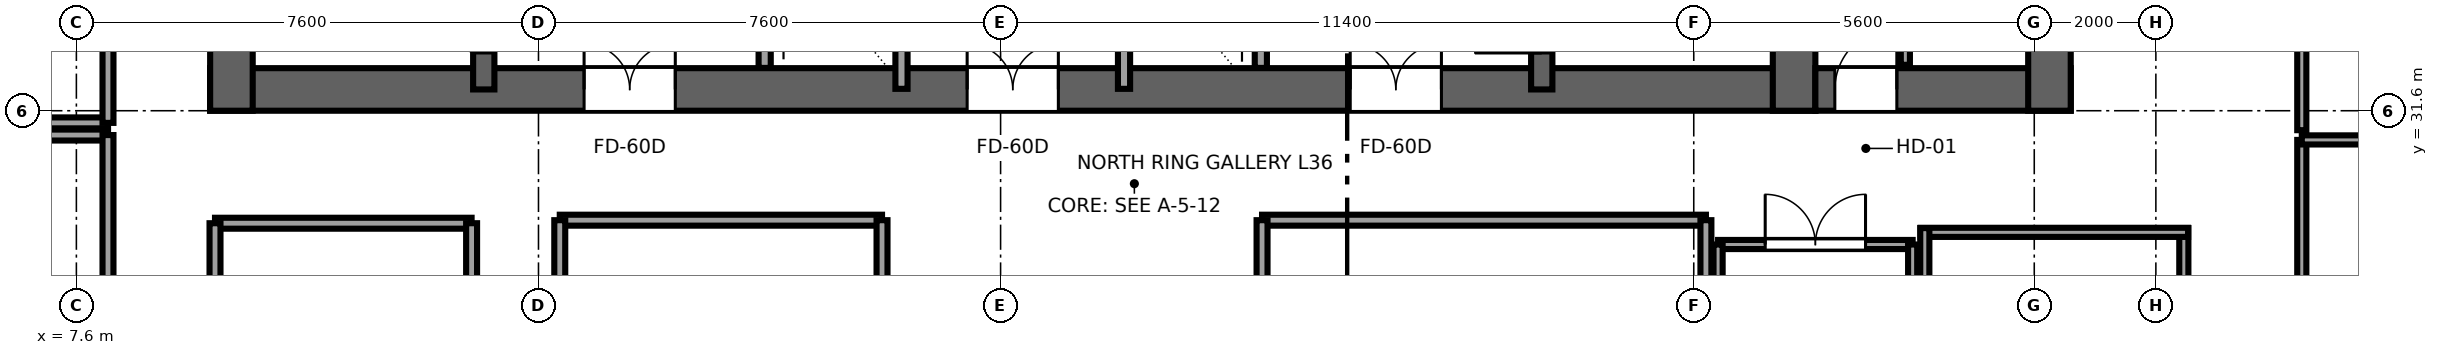
"""IFC4 building model, lengths in metres.
Left out: names, types, materials, properties, quantities, classifications, styles, units other than length and angle.
Written with IfcOpenShell. Run it as: python <this file> out.ifc"""

import sys

from ifc_helpers import new_model, si_unit, direction, frame, frame_2d, origin, place, context, subcontext, project, spatial, rectangle, extrude, source, transform, mapped, element, fill, save


model = new_model("IFC4")
c1 = context("Model", 3, precision=1e-05, world=origin(), true_north=direction((0.0, 1.0)))
c2 = subcontext(c1, "Body", "Model", "MODEL_VIEW")
j1 = project(units=[si_unit("LENGTHUNIT", "METRE"), si_unit("PLANEANGLEUNIT", "RADIAN")], contexts=[c1])
p1 = place(None, origin())
s1 = spatial("IfcSite", under=j1, at=p1, CompositionType="ELEMENT")
p2 = place(p1, origin())
s2 = spatial("IfcBuilding", under=s1, at=p2, CompositionType="ELEMENT")
p3 = place(p2, frame((0.0, 0.0, 139.95)))
s3 = spatial("IfcBuildingStorey", under=s2, at=p3, CompositionType="ELEMENT", Elevation=139.95)
p4 = place(p3, frame((9.8, 31.95, 0.0), z_axis=(0.0, 0.0, 1.0), x_axis=(1.0, 0.0, 0.0)))
e1 = element("IfcWall", 1, at=p4, inside=s3, PredefinedType="SHEAR", context=c2, shape_type="SweptSolid", body=[
    extrude(rectangle(XDim=26.4, YDim=0.7, at=frame_2d((13.2, 0.0))), origin(), (0.0, 0.0, 1.0), 3.55),
])
p5 = place(p4, frame((7.65, 0.0, 0.0), z_axis=(0.0, 0.0, 1.0), x_axis=(-1.0, 0.0, 0.0)))
e2 = element("IfcOpeningElement", 2, at=p5, cuts=e1, PredefinedType="OPENING", context=c2, shape_type="SweptSolid", body=[
    extrude(rectangle(XDim=1.5, YDim=2.04, at=frame_2d((0.75, 1.02))), frame((0.0, 0.36, 0.0), z_axis=(0.0, -1.0, 0.0), x_axis=(1.0, 0.0, 0.0)), (0.0, 0.0, 1.0), 0.72),
])
p6 = place(p4, frame((13.95, 0.0, 0.0), z_axis=(0.0, 0.0, 1.0), x_axis=(-1.0, 0.0, 0.0)))
e3 = element("IfcOpeningElement", 3, at=p6, cuts=e1, PredefinedType="OPENING", context=c2, shape_type="SweptSolid", body=[
    extrude(rectangle(XDim=1.5, YDim=2.04, at=frame_2d((0.75, 1.02))), frame((0.0, 0.36, 0.0), z_axis=(0.0, -1.0, 0.0), x_axis=(1.0, 0.0, 0.0)), (0.0, 0.0, 1.0), 0.72),
])
p7 = place(p4, frame((20.25, 0.0, 0.0), z_axis=(0.0, 0.0, 1.0), x_axis=(-1.0, 0.0, 0.0)))
e4 = element("IfcOpeningElement", 4, at=p7, cuts=e1, PredefinedType="OPENING", context=c2, shape_type="SweptSolid", body=[
    extrude(rectangle(XDim=1.5, YDim=2.04, at=frame_2d((0.75, 1.02))), frame((0.0, 0.36, 0.0), z_axis=(0.0, -1.0, 0.0), x_axis=(1.0, 0.0, 0.0)), (0.0, 0.0, 1.0), 0.72),
])
for number, where, z_axis, x_axis in (
    (5, (10.15, 31.6, 0.0), (0.0, 0.0, 1.0), (0.0, 1.0, 0.0)),
    (6, (35.85, 31.6, 0.0), (0.0, 0.0, 1.0), (0.0, 1.0, 0.0)),
):
    element("IfcWall", number, at=place(p3, frame(where, z_axis=z_axis, x_axis=x_axis)), inside=s3, PredefinedType="SHEAR", context=c2, shape_type="SweptSolid", body=[
        extrude(rectangle(XDim=13.6, YDim=0.7, at=frame_2d((6.8, 0.0))), origin(), (0.0, 0.0, 1.0), 3.55),
    ])
p8 = place(p3, frame((14.3, 31.95, 0.0), z_axis=(0.0, 0.0, 1.0), x_axis=(0.0, 1.0, 0.0)))
e7 = element("IfcWall", 7, at=p8, inside=s3, PredefinedType="SHEAR", context=c2, shape_type="SweptSolid", body=[
    extrude(rectangle(XDim=12.9, YDim=0.35, at=frame_2d((6.45, 0.0))), origin(), (0.0, 0.0, 1.0), 3.55),
])
p9 = place(p8, frame((0.6, 0.0, 0.0)))
e8 = element("IfcOpeningElement", 8, at=p9, cuts=e7, PredefinedType="OPENING", context=c2, shape_type="SweptSolid", body=[
    extrude(rectangle(XDim=1.1, YDim=2.12, at=frame_2d((0.55, 1.06))), frame((0.0, 0.185, 0.0), z_axis=(0.0, -1.0, 0.0), x_axis=(1.0, 0.0, 0.0)), (0.0, 0.0, 1.0), 0.37),
])
p10 = place(p3, frame((31.7, 31.95, 0.0), z_axis=(0.0, 0.0, 1.0), x_axis=(0.0, 1.0, 0.0)))
e9 = element("IfcWall", 9, at=p10, inside=s3, PredefinedType="SHEAR", context=c2, shape_type="SweptSolid", body=[
    extrude(rectangle(XDim=12.9, YDim=0.35, at=frame_2d((6.45, 0.0))), origin(), (0.0, 0.0, 1.0), 3.55),
])
p11 = place(p10, frame((1.7, 0.0, 0.0), z_axis=(0.0, 0.0, 1.0), x_axis=(-1.0, 0.0, 0.0)))
e10 = element("IfcOpeningElement", 10, at=p11, cuts=e9, PredefinedType="OPENING", context=c2, shape_type="SweptSolid", body=[
    extrude(rectangle(XDim=1.1, YDim=2.12, at=frame_2d((0.55, 1.06))), frame((0.0, 0.185, 0.0), z_axis=(0.0, -1.0, 0.0), x_axis=(1.0, 0.0, 0.0)), (0.0, 0.0, 1.0), 0.37),
])
p12 = place(p3, frame((36.2, 31.95, 0.0), z_axis=(0.0, 0.0, 1.0), x_axis=(1.0, 0.0, 0.0)))
e11 = element("IfcWall", 11, at=p12, inside=s3, PredefinedType="SHEAR", context=c2, shape_type="SweptSolid", body=[
    extrude(rectangle(XDim=4.2, YDim=0.7, at=frame_2d((2.1, 0.0))), origin(), (0.0, 0.0, 1.0), 3.55),
])
p13 = place(p12, frame((1.34, 0.0, 0.0), z_axis=(0.0, 0.0, 1.0), x_axis=(-1.0, 0.0, 0.0)))
e12 = element("IfcOpeningElement", 12, at=p13, cuts=e11, PredefinedType="OPENING", context=c2, shape_type="SweptSolid", body=[
    extrude(rectangle(XDim=1.02, YDim=2.03, at=frame_2d((0.51, 1.015))), frame((0.0, 0.36, 0.0), z_axis=(0.0, -1.0, 0.0), x_axis=(1.0, 0.0, 0.0)), (0.0, 0.0, 1.0), 0.72),
])
p14 = place(p3, frame((40.05, 31.6, 0.0), z_axis=(0.0, 0.0, 1.0), x_axis=(0.0, 1.0, 0.0)))
e13 = element("IfcWall", 13, at=p14, inside=s3, PredefinedType="SHEAR", context=c2, shape_type="SweptSolid", body=[
    extrude(rectangle(XDim=13.6, YDim=0.7, at=frame_2d((6.8, 0.0))), origin(), (0.0, 0.0, 1.0), 3.55),
])
for number, where, z_axis, x_axis in (
    (14, (18.92, 32.304, 0.0), (0.0, 0.0, 1.0), (0.0, 1.0, 0.0)),
    (15, (27.08, 32.304, 0.0), (0.0, 0.0, 1.0), (0.0, 1.0, 0.0)),
):
    element("IfcWall", number, at=place(p3, frame(where, z_axis=z_axis, x_axis=x_axis)), inside=s3, PredefinedType="SOLIDWALL", context=c2, shape_type="SweptSolid", body=[
        extrude(rectangle(XDim=3.846, YDim=0.2, at=frame_2d((1.923, 0.0))), origin(), (0.0, 0.0, 1.0), 3.37),
    ])
p15 = place(p3, frame((21.17, 31.96, 0.0), z_axis=(0.0, 0.0, 1.0), x_axis=(0.0, 1.0, 0.0)))
e16 = element("IfcWall", 16, at=p15, inside=s3, PredefinedType="SOLIDWALL", context=c2, shape_type="SweptSolid", body=[
    extrude(rectangle(XDim=12.58, YDim=0.2, at=frame_2d((6.29, 0.0))), origin(), (0.0, 0.0, 1.0), 3.37),
])
p16 = place(p15, frame((5.74, 0.0, 0.0)))
e17 = element("IfcOpeningElement", 17, at=p16, cuts=e16, PredefinedType="OPENING", context=c2, shape_type="SweptSolid", body=[
    extrude(rectangle(XDim=1.1, YDim=2.12, at=frame_2d((0.55, 1.06))), frame((0.0, 0.11, 0.0), z_axis=(0.0, -1.0, 0.0), x_axis=(1.0, 0.0, 0.0)), (0.0, 0.0, 1.0), 0.22),
])
p17 = place(p15, frame((8.24, 0.0, 0.0)))
e18 = element("IfcOpeningElement", 18, at=p17, cuts=e16, PredefinedType="OPENING", context=c2, shape_type="SweptSolid", body=[
    extrude(rectangle(XDim=1.1, YDim=2.12, at=frame_2d((0.55, 1.06))), frame((0.0, 0.11, 0.0), z_axis=(0.0, -1.0, 0.0), x_axis=(1.0, 0.0, 0.0)), (0.0, 0.0, 1.0), 0.22),
])
p18 = place(p3, frame((24.83, 31.96, 0.0), z_axis=(0.0, 0.0, 1.0), x_axis=(0.0, 1.0, 0.0)))
e19 = element("IfcWall", 19, at=p18, inside=s3, PredefinedType="SOLIDWALL", context=c2, shape_type="SweptSolid", body=[
    extrude(rectangle(XDim=12.58, YDim=0.2, at=frame_2d((6.29, 0.0))), origin(), (0.0, 0.0, 1.0), 3.37),
])
p19 = place(p18, frame((5.74, 0.0, 0.0)))
e20 = element("IfcOpeningElement", 20, at=p19, cuts=e19, PredefinedType="OPENING", context=c2, shape_type="SweptSolid", body=[
    extrude(rectangle(XDim=1.1, YDim=2.12, at=frame_2d((0.55, 1.06))), frame((0.0, 0.11, 0.0), z_axis=(0.0, -1.0, 0.0), x_axis=(1.0, 0.0, 0.0)), (0.0, 0.0, 1.0), 0.22),
])
p20 = place(p18, frame((8.24, 0.0, 0.0)))
e21 = element("IfcOpeningElement", 21, at=p20, cuts=e19, PredefinedType="OPENING", context=c2, shape_type="SweptSolid", body=[
    extrude(rectangle(XDim=1.1, YDim=2.12, at=frame_2d((0.55, 1.06))), frame((0.0, 0.11, 0.0), z_axis=(0.0, -1.0, 0.0), x_axis=(1.0, 0.0, 0.0)), (0.0, 0.0, 1.0), 0.22),
])
p21 = place(p3, frame((37.68, 32.355, 0.0), z_axis=(0.0, 0.0, 1.0), x_axis=(0.0, 1.0, 0.0)))
e22 = element("IfcWall", 22, at=p21, inside=s3, PredefinedType="PARTITIONING", context=c2, shape_type="SweptSolid", body=[
    extrude(rectangle(XDim=5.845, YDim=0.15, at=frame_2d((2.922, 0.0))), origin(), (0.0, 0.0, 1.0), 3.37),
])
p22 = place(p21, frame((2.413, 0.0, 0.0)))
e23 = element("IfcOpeningElement", 23, at=p22, cuts=e22, PredefinedType="OPENING", context=c2, shape_type="SweptSolid", body=[
    extrude(rectangle(XDim=1.02, YDim=2.03, at=frame_2d((0.51, 1.015))), frame((0.0, 0.085, 0.0), z_axis=(0.0, -1.0, 0.0), x_axis=(1.0, 0.0, 0.0)), (0.0, 0.0, 1.0), 0.17),
])
p23 = place(p3, frame((0.405, 31.2, 0.0), z_axis=(0.0, 0.0, 1.0), x_axis=(1.0, 0.0, 0.0)))
e24 = element("IfcWall", 24, at=p23, inside=s3, PredefinedType="PARTITIONING", context=c2, shape_type="SweptSolid", body=[
    extrude(rectangle(XDim=7.715, YDim=0.18, at=frame_2d((3.857, 0.0))), origin(), (0.0, 0.0, 1.0), 3.37),
])
p24 = place(p3, frame((8.12, 23.7, 0.0), z_axis=(0.0, 0.0, 1.0), x_axis=(0.0, 1.0, 0.0)))
e25 = element("IfcWall", 25, at=p24, inside=s3, PredefinedType="PARTITIONING", context=c2, shape_type="SweptSolid", body=[
    extrude(rectangle(XDim=7.5, YDim=0.18, at=frame_2d((3.75, 0.0))), origin(), (0.0, 0.0, 1.0), 3.37),
])
p25 = place(p24, frame((2.925, 0.0, 0.0)))
e26 = element("IfcOpeningElement", 26, at=p25, cuts=e25, PredefinedType="OPENING", context=c2, shape_type="SweptSolid", body=[
    extrude(rectangle(XDim=1.65, YDim=2.15, at=frame_2d((0.825, 1.075))), frame((0.0, 0.1, 0.0), z_axis=(0.0, -1.0, 0.0), x_axis=(1.0, 0.0, 0.0)), (0.0, 0.0, 1.0), 0.2),
])
p26 = place(p3, frame((0.405, 31.4, 0.0), z_axis=(0.0, 0.0, 1.0), x_axis=(1.0, 0.0, 0.0)))
e27 = element("IfcWall", 27, at=p26, inside=s3, PredefinedType="PARTITIONING", context=c2, shape_type="SweptSolid", body=[
    extrude(rectangle(XDim=7.715, YDim=0.18, at=frame_2d((3.857, 0.0))), origin(), (0.0, 0.0, 1.0), 3.37),
])
p27 = place(p3, frame((8.12, 31.4, 0.0), z_axis=(0.0, 0.0, 1.0), x_axis=(0.0, 1.0, 0.0)))
e28 = element("IfcWall", 28, at=p27, inside=s3, PredefinedType="PARTITIONING", context=c2, shape_type="SweptSolid", body=[
    extrude(rectangle(XDim=6.8, YDim=0.18, at=frame_2d((3.4, 0.0))), origin(), (0.0, 0.0, 1.0), 3.37),
])
p28 = place(p27, frame((3.175, 0.0, 0.0)))
e29 = element("IfcOpeningElement", 29, at=p28, cuts=e28, PredefinedType="OPENING", context=c2, shape_type="SweptSolid", body=[
    extrude(rectangle(XDim=1.65, YDim=2.15, at=frame_2d((0.825, 1.075))), frame((0.0, 0.1, 0.0), z_axis=(0.0, -1.0, 0.0), x_axis=(1.0, 0.0, 0.0)), (0.0, 0.0, 1.0), 0.2),
])
p29 = place(p3, frame((44.2, 23.78, 0.0), z_axis=(0.0, 0.0, 1.0), x_axis=(0.0, 1.0, 0.0)))
e30 = element("IfcWall", 30, at=p29, inside=s3, PredefinedType="PARTITIONING", context=c2, shape_type="SweptSolid", body=[
    extrude(rectangle(XDim=7.34, YDim=0.15, at=frame_2d((3.67, 0.0))), origin(), (0.0, 0.0, 1.0), 3.37),
])
p30 = place(p29, frame((3.18, 0.0, 0.0)))
e31 = element("IfcOpeningElement", 31, at=p30, cuts=e30, PredefinedType="OPENING", context=c2, shape_type="SweptSolid", body=[
    extrude(rectangle(XDim=0.98, YDim=2.12, at=frame_2d((0.49, 1.06))), frame((0.0, 0.085, 0.0), z_axis=(0.0, -1.0, 0.0), x_axis=(1.0, 0.0, 0.0)), (0.0, 0.0, 1.0), 0.17),
])
p31 = place(p3, frame((44.2, 31.12, 0.0), z_axis=(0.0, 0.0, 1.0), x_axis=(1.0, 0.0, 0.0)))
e32 = element("IfcWall", 32, at=p31, inside=s3, PredefinedType="PARTITIONING", context=c2, shape_type="SweptSolid", body=[
    extrude(rectangle(XDim=10.03, YDim=0.15, at=frame_2d((5.015, 0.0))), origin(), (0.0, 0.0, 1.0), 3.37),
])
p32 = place(p3, frame((44.2, 31.28, 0.0), z_axis=(0.0, 0.0, 1.0), x_axis=(0.0, 1.0, 0.0)))
e33 = element("IfcWall", 33, at=p32, inside=s3, PredefinedType="PARTITIONING", context=c2, shape_type="SweptSolid", body=[
    extrude(rectangle(XDim=6.24, YDim=0.15, at=frame_2d((3.12, 0.0))), origin(), (0.0, 0.0, 1.0), 3.37),
])
p33 = place(p32, frame((2.63, 0.0, 0.0)))
e34 = element("IfcOpeningElement", 34, at=p33, cuts=e33, PredefinedType="OPENING", context=c2, shape_type="SweptSolid", body=[
    extrude(rectangle(XDim=0.98, YDim=2.12, at=frame_2d((0.49, 1.06))), frame((0.0, 0.085, 0.0), z_axis=(0.0, -1.0, 0.0), x_axis=(1.0, 0.0, 0.0)), (0.0, 0.0, 1.0), 0.17),
])
p34 = place(p3, frame((42.26, 25.93, 0.0), z_axis=(0.0, 0.0, 1.0), x_axis=(0.0, 1.0, 0.0)))
e35 = element("IfcWall", 35, at=p34, inside=s3, PredefinedType="PARTITIONING", context=c2, shape_type="SweptSolid", body=[
    extrude(rectangle(XDim=3.74, YDim=0.15, at=frame_2d((1.87, 0.0))), origin(), (0.0, 0.0, 1.0), 3.37),
])
p35 = place(p34, frame((1.19, 0.0, 0.0)))
e36 = element("IfcOpeningElement", 36, at=p35, cuts=e35, PredefinedType="OPENING", context=c2, shape_type="SweptSolid", body=[
    extrude(rectangle(XDim=0.92, YDim=2.01, at=frame_2d((0.46, 1.005))), frame((0.0, 0.085, 0.0), z_axis=(0.0, -1.0, 0.0), x_axis=(1.0, 0.0, 0.0)), (0.0, 0.0, 1.0), 0.17),
])
p36 = place(p3, frame((37.93, 29.6, 0.0), z_axis=(0.0, 0.0, 1.0), x_axis=(1.0, 0.0, 0.0)))
e37 = element("IfcWall", 37, at=p36, inside=s3, PredefinedType="PARTITIONING", context=c2, shape_type="SweptSolid", body=[
    extrude(rectangle(XDim=4.4, YDim=0.15, at=frame_2d((2.2, 0.0))), origin(), (0.0, 0.0, 1.0), 3.37),
])
p37 = place(p3, frame((38.0, 25.93, 0.0), z_axis=(0.0, 0.0, 1.0), x_axis=(0.0, 1.0, 0.0)))
e38 = element("IfcWall", 38, at=p37, inside=s3, PredefinedType="PARTITIONING", context=c2, shape_type="SweptSolid", body=[
    extrude(rectangle(XDim=3.74, YDim=0.15, at=frame_2d((1.87, 0.0))), origin(), (0.0, 0.0, 1.0), 3.37),
])
p38 = place(p3, frame((9.88, 29.75, 0.0), z_axis=(0.0, 0.0, 1.0), x_axis=(1.0, 0.0, 0.0)))
e39 = element("IfcWall", 39, at=p38, inside=s3, PredefinedType="PARTITIONING", context=c2, shape_type="SweptSolid", body=[
    extrude(rectangle(XDim=4.22, YDim=0.18, at=frame_2d((2.11, 0.0))), origin(), (0.0, 0.0, 1.0), 3.37),
])
for number, where, z_axis, x_axis in (
    (40, (9.88, 23.7, 0.0), (0.0, 0.0, 1.0), (0.0, 1.0, 0.0)),
    (41, (14.1, 23.7, 0.0), (0.0, 0.0, 1.0), (0.0, 1.0, 0.0)),
):
    element("IfcWall", number, at=place(p3, frame(where, z_axis=z_axis, x_axis=x_axis)), inside=s3, PredefinedType="PARTITIONING", context=c2, shape_type="SweptSolid", body=[
        extrude(rectangle(XDim=6.05, YDim=0.18, at=frame_2d((3.025, 0.0))), origin(), (0.0, 0.0, 1.0), 3.37),
    ])
p39 = place(p3, frame((27.1, 29.8, 0.0), z_axis=(0.0, 0.0, 1.0), x_axis=(1.0, 0.0, 0.0)))
e42 = element("IfcWall", 42, at=p39, inside=s3, PredefinedType="PARTITIONING", context=c2, shape_type="SweptSolid", body=[
    extrude(rectangle(XDim=7.3, YDim=0.18, at=frame_2d((3.65, 0.0))), origin(), (0.0, 0.0, 1.0), 3.37),
])
for number, where, z_axis, x_axis in (
    (43, (27.1, 23.7, 0.0), (0.0, 0.0, 1.0), (0.0, 1.0, 0.0)),
    (44, (34.4, 23.7, 0.0), (0.0, 0.0, 1.0), (0.0, 1.0, 0.0)),
):
    element("IfcWall", number, at=place(p3, frame(where, z_axis=z_axis, x_axis=x_axis)), inside=s3, PredefinedType="PARTITIONING", context=c2, shape_type="SweptSolid", body=[
        extrude(rectangle(XDim=6.1, YDim=0.18, at=frame_2d((3.05, 0.0))), origin(), (0.0, 0.0, 1.0), 3.37),
    ])
p40 = place(p3, frame((15.55, 29.8, 0.0), z_axis=(0.0, 0.0, 1.0), x_axis=(1.0, 0.0, 0.0)))
e45 = element("IfcWall", 45, at=p40, inside=s3, PredefinedType="PARTITIONING", context=c2, shape_type="SweptSolid", body=[
    extrude(rectangle(XDim=5.3, YDim=0.18, at=frame_2d((2.65, 0.0))), origin(), (0.0, 0.0, 1.0), 3.37),
])
for number, where, z_axis, x_axis in (
    (46, (15.55, 23.7, 0.0), (0.0, 0.0, 1.0), (0.0, 1.0, 0.0)),
    (47, (20.85, 23.7, 0.0), (0.0, 0.0, 1.0), (0.0, 1.0, 0.0)),
):
    element("IfcWall", number, at=place(p3, frame(where, z_axis=z_axis, x_axis=x_axis)), inside=s3, PredefinedType="PARTITIONING", context=c2, shape_type="SweptSolid", body=[
        extrude(rectangle(XDim=6.1, YDim=0.18, at=frame_2d((3.05, 0.0))), origin(), (0.0, 0.0, 1.0), 3.37),
    ])
p41 = place(p3, frame((34.6, 29.4, 0.0), z_axis=(0.0, 0.0, 1.0), x_axis=(1.0, 0.0, 0.0)))
e48 = element("IfcWall", 48, at=p41, inside=s3, PredefinedType="PARTITIONING", context=c2, shape_type="SweptSolid", body=[
    extrude(rectangle(XDim=3.2, YDim=0.15, at=frame_2d((1.6, 0.0))), origin(), (0.0, 0.0, 1.0), 3.37),
])
p42 = place(p41, frame((0.775, 0.0, 0.0)))
e49 = element("IfcOpeningElement", 49, at=p42, cuts=e48, PredefinedType="OPENING", context=c2, shape_type="SweptSolid", body=[
    extrude(rectangle(XDim=1.65, YDim=2.15, at=frame_2d((0.825, 1.075))), frame((0.0, 0.085, 0.0), z_axis=(0.0, -1.0, 0.0), x_axis=(1.0, 0.0, 0.0)), (0.0, 0.0, 1.0), 0.17),
])
for number, where, z_axis, x_axis in (
    (50, (34.6, 23.7, 0.0), (0.0, 0.0, 1.0), (0.0, 1.0, 0.0)),
    (51, (37.8, 23.7, 0.0), (0.0, 0.0, 1.0), (0.0, 1.0, 0.0)),
):
    element("IfcWall", number, at=place(p3, frame(where, z_axis=z_axis, x_axis=x_axis)), inside=s3, PredefinedType="PARTITIONING", context=c2, shape_type="SweptSolid", body=[
        extrude(rectangle(XDim=5.7, YDim=0.15, at=frame_2d((2.85, 0.0))), origin(), (0.0, 0.0, 1.0), 3.37),
    ])
m1 = source(origin(), c2, "Body", "SweptSolid", [
    extrude(rectangle(XDim=1.1, YDim=2.12, at=frame_2d((0.55, 1.06))), frame((0.0, 0.025, 0.0), z_axis=(0.0, -1.0, 0.0), x_axis=(1.0, 0.0, 0.0)), (0.0, 0.0, 1.0), 0.05),
])
p43 = place(p9, origin())
e52 = element("IfcDoor", 52, at=p43, inside=s3, OperationType="SINGLE_SWING_RIGHT", PredefinedType="DOOR", context=c2, shape_type="MappedRepresentation", body=[
    mapped(m1, transform((0.0, 0.0, 0.0), x_axis=(1.0, 0.0, 0.0), y_axis=(0.0, 1.0, 0.0), z_axis=(0.0, 0.0, 1.0), scale=1.0)),
])
fill(e8, e52)
p44 = place(p11, origin())
e53 = element("IfcDoor", 53, at=p44, inside=s3, OperationType="SINGLE_SWING_LEFT", PredefinedType="DOOR", context=c2, shape_type="MappedRepresentation", body=[
    mapped(m1, transform((0.0, 0.0, 0.0), x_axis=(1.0, 0.0, 0.0), y_axis=(0.0, 1.0, 0.0), z_axis=(0.0, 0.0, 1.0), scale=1.0)),
])
fill(e10, e53)
m2 = source(origin(), c2, "Body", "SweptSolid", [
    extrude(rectangle(XDim=1.5, YDim=2.04, at=frame_2d((0.75, 1.02))), frame((0.0, 0.025, 0.0), z_axis=(0.0, -1.0, 0.0), x_axis=(1.0, 0.0, 0.0)), (0.0, 0.0, 1.0), 0.05),
])
p45 = place(p5, origin())
e54 = element("IfcDoor", 54, at=p45, inside=s3, OperationType="DOUBLE_DOOR_SINGLE_SWING", PredefinedType="DOOR", context=c2, shape_type="MappedRepresentation", body=[
    mapped(m2, transform((0.0, 0.0, 0.0), x_axis=(1.0, 0.0, 0.0), y_axis=(0.0, 1.0, 0.0), z_axis=(0.0, 0.0, 1.0), scale=1.0)),
])
fill(e2, e54)
p46 = place(p6, origin())
e55 = element("IfcDoor", 55, at=p46, inside=s3, OperationType="DOUBLE_DOOR_SINGLE_SWING", PredefinedType="DOOR", context=c2, shape_type="MappedRepresentation", body=[
    mapped(m2, transform((0.0, 0.0, 0.0), x_axis=(1.0, 0.0, 0.0), y_axis=(0.0, 1.0, 0.0), z_axis=(0.0, 0.0, 1.0), scale=1.0)),
])
fill(e3, e55)
p47 = place(p7, origin())
e56 = element("IfcDoor", 56, at=p47, inside=s3, OperationType="DOUBLE_DOOR_SINGLE_SWING", PredefinedType="DOOR", context=c2, shape_type="MappedRepresentation", body=[
    mapped(m2, transform((0.0, 0.0, 0.0), x_axis=(1.0, 0.0, 0.0), y_axis=(0.0, 1.0, 0.0), z_axis=(0.0, 0.0, 1.0), scale=1.0)),
])
fill(e4, e56)
m3 = source(origin(), c2, "Body", "SweptSolid", [
    extrude(rectangle(XDim=1.02, YDim=2.03, at=frame_2d((0.51, 1.015))), frame((0.0, 0.025, 0.0), z_axis=(0.0, -1.0, 0.0), x_axis=(1.0, 0.0, 0.0)), (0.0, 0.0, 1.0), 0.05),
])
p48 = place(p13, origin())
e57 = element("IfcDoor", 57, at=p48, inside=s3, OperationType="SINGLE_SWING_RIGHT", PredefinedType="DOOR", context=c2, shape_type="MappedRepresentation", body=[
    mapped(m3, transform((0.0, 0.0, 0.0), x_axis=(1.0, 0.0, 0.0), y_axis=(0.0, 1.0, 0.0), z_axis=(0.0, 0.0, 1.0), scale=1.0)),
])
fill(e12, e57)
m4 = source(origin(), c2, "Body", "SweptSolid", [
    extrude(rectangle(XDim=1.65, YDim=2.15, at=frame_2d((0.825, 1.075))), frame((0.0, 0.025, 0.0), z_axis=(0.0, -1.0, 0.0), x_axis=(1.0, 0.0, 0.0)), (0.0, 0.0, 1.0), 0.05),
])
p49 = place(p42, origin())
e58 = element("IfcDoor", 58, at=p49, inside=s3, OperationType="DOUBLE_DOOR_SINGLE_SWING", PredefinedType="DOOR", context=c2, shape_type="MappedRepresentation", body=[
    mapped(m4, transform((0.0, 0.0, 0.0), x_axis=(1.0, 0.0, 0.0), y_axis=(0.0, 1.0, 0.0), z_axis=(0.0, 0.0, 1.0), scale=1.0)),
])
fill(e49, e58)
save(model, sys.argv[1])
